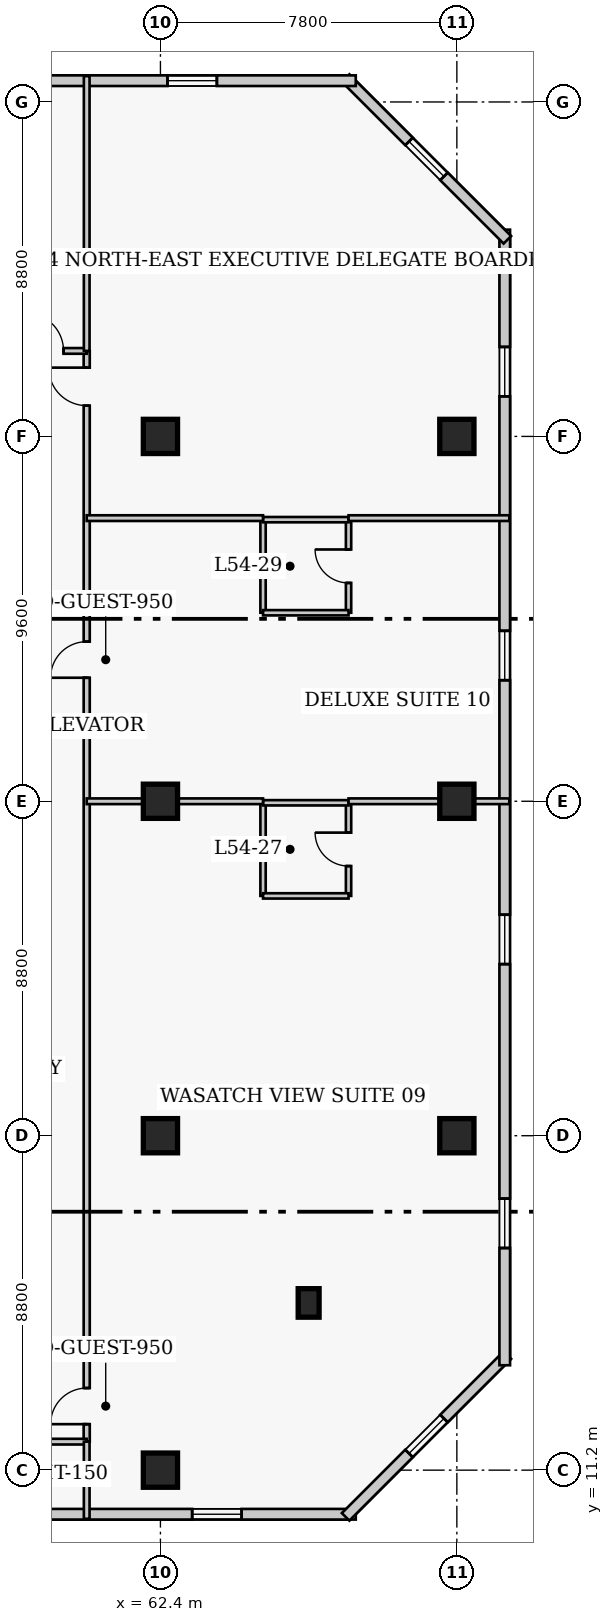
"""IFC4 building model, lengths in metres.
Left out: names, types, materials, properties, quantities, classifications, styles, units other than length and angle.
Written with IfcOpenShell. Run it as: python <this file> out.ifc"""

import sys

from ifc_helpers import new_model, si_unit, direction, frame, frame_2d, origin, origin_2d, place, context, subcontext, project, spatial, rectangle, extrude, element, fill, save


model = new_model("IFC4")
c1 = context("Model", 3, precision=1e-05, world=origin(), true_north=direction((0.0, 1.0)))
c2 = subcontext(c1, "Body", "Model", "MODEL_VIEW")
j1 = project(units=[si_unit("LENGTHUNIT", "METRE"), si_unit("PLANEANGLEUNIT", "RADIAN")], contexts=[c1])
p1 = place(None, origin())
s1 = spatial("IfcSite", under=j1, at=p1, CompositionType="ELEMENT")
p2 = place(p1, origin())
s2 = spatial("IfcBuilding", under=s1, at=p2, CompositionType="ELEMENT")
p3 = place(p2, frame((0.0, 0.0, 216.3)))
s3 = spatial("IfcBuildingStorey", under=s2, at=p3, CompositionType="ELEMENT", Elevation=216.3)
for number, where, z_axis, x_axis in (
    (1, (62.4, 11.2, 0.0), (0.0, 0.0, 1.0), (1.0, 0.0, 0.0)),
    (2, (62.4, 20.0, 0.0), (0.0, 0.0, 1.0), (1.0, 0.0, 0.0)),
    (3, (62.4, 28.8, 0.0), (0.0, 0.0, 1.0), (1.0, 0.0, 0.0)),
    (4, (62.4, 38.4, 0.0), (0.0, 0.0, 1.0), (1.0, 0.0, 0.0)),
    (5, (70.2, 20.0, 0.0), (0.0, 0.0, 1.0), (1.0, 0.0, 0.0)),
    (6, (70.2, 28.8, 0.0), (0.0, 0.0, 1.0), (1.0, 0.0, 0.0)),
    (7, (70.2, 38.4, 0.0), (0.0, 0.0, 1.0), (1.0, 0.0, 0.0)),
):
    element("IfcColumn", number, at=place(p3, frame(where, z_axis=z_axis, x_axis=x_axis)), inside=s3, PredefinedType="COLUMN", context=c2, shape_type="SweptSolid", body=[
        extrude(rectangle(XDim=0.9, YDim=0.9, at=origin_2d()), origin(), (0.0, 0.0, 1.0), 3.9),
    ])
p4 = place(p3, frame((66.3, 15.6, 0.0), z_axis=(0.0, 0.0, 1.0), x_axis=(1.0, 0.0, 0.0)))
e8 = element("IfcColumn", 8, at=p4, inside=s3, PredefinedType="PILASTER", context=c2, shape_type="SweptSolid", body=[
    extrude(rectangle(XDim=0.55, YDim=0.75, at=origin_2d()), origin(), (0.0, 0.0, 1.0), 3.9),
])
p5 = place(p3, frame((41.71, 10.04, 0.0), z_axis=(0.0, 0.0, 1.0), x_axis=(1.0, 0.0, 0.0)))
e9 = element("IfcWall", 9, at=p5, inside=s3, PredefinedType="SOLIDWALL", context=c2, shape_type="SweptSolid", body=[
    extrude(rectangle(XDim=25.83, YDim=0.28, at=frame_2d((12.915, 0.0))), origin(), (0.0, 0.0, 1.0), 3.65),
])
p6 = place(p5, frame((3.005, 0.0, 0.85)))
e10 = element("IfcOpeningElement", 10, at=p6, cuts=e9, PredefinedType="OPENING", context=c2, shape_type="SweptSolid", body=[
    extrude(rectangle(XDim=1.3, YDim=1.7, at=frame_2d((0.65, 0.85))), frame((0.0, 0.15, 0.0), z_axis=(0.0, -1.0, 0.0), x_axis=(1.0, 0.0, 0.0)), (0.0, 0.0, 1.0), 0.3),
])
p7 = place(p5, frame((13.415, 0.0, 0.85)))
e11 = element("IfcOpeningElement", 11, at=p7, cuts=e9, PredefinedType="OPENING", context=c2, shape_type="SweptSolid", body=[
    extrude(rectangle(XDim=1.3, YDim=1.7, at=frame_2d((0.65, 0.85))), frame((0.0, 0.15, 0.0), z_axis=(0.0, -1.0, 0.0), x_axis=(1.0, 0.0, 0.0)), (0.0, 0.0, 1.0), 0.3),
])
p8 = place(p5, frame((21.525, 0.0, 0.85)))
e12 = element("IfcOpeningElement", 12, at=p8, cuts=e9, PredefinedType="OPENING", context=c2, shape_type="SweptSolid", body=[
    extrude(rectangle(XDim=1.3, YDim=1.7, at=frame_2d((0.65, 0.85))), frame((0.0, 0.15, 0.0), z_axis=(0.0, -1.0, 0.0), x_axis=(1.0, 0.0, 0.0)), (0.0, 0.0, 1.0), 0.3),
])
p9 = place(p3, frame((67.273, 9.971, 0.0), z_axis=(0.0, 0.0, 1.0), x_axis=(0.707106781187, 0.707106781187, 0.0)))
e13 = element("IfcWall", 13, at=p9, inside=s3, PredefinedType="SOLIDWALL", context=c2, shape_type="SweptSolid", body=[
    extrude(rectangle(XDim=6.02, YDim=0.28, at=frame_2d((3.01, 0.0))), origin(), (0.0, 0.0, 1.0), 3.65),
])
p10 = place(p9, frame((2.36, 0.0, 0.85)))
e14 = element("IfcOpeningElement", 14, at=p10, cuts=e13, PredefinedType="OPENING", context=c2, shape_type="SweptSolid", body=[
    extrude(rectangle(XDim=1.3, YDim=1.7, at=frame_2d((0.65, 0.85))), frame((0.0, 0.15, 0.0), z_axis=(0.0, -1.0, 0.0), x_axis=(1.0, 0.0, 0.0)), (0.0, 0.0, 1.0), 0.3),
])
p11 = place(p3, frame((71.46, 13.96, 0.0), z_axis=(0.0, 0.0, 1.0), x_axis=(0.0, 1.0, 0.0)))
e15 = element("IfcWall", 15, at=p11, inside=s3, PredefinedType="SOLIDWALL", context=c2, shape_type="SweptSolid", body=[
    extrude(rectangle(XDim=29.88, YDim=0.28, at=frame_2d((14.94, 0.0))), origin(), (0.0, 0.0, 1.0), 3.65),
])
p12 = place(p11, frame((3.085, 0.0, 0.85)))
e16 = element("IfcOpeningElement", 16, at=p12, cuts=e15, PredefinedType="OPENING", context=c2, shape_type="SweptSolid", body=[
    extrude(rectangle(XDim=1.3, YDim=1.7, at=frame_2d((0.65, 0.85))), frame((0.0, 0.15, 0.0), z_axis=(0.0, -1.0, 0.0), x_axis=(1.0, 0.0, 0.0)), (0.0, 0.0, 1.0), 0.3),
])
p13 = place(p11, frame((10.555, 0.0, 0.85)))
e17 = element("IfcOpeningElement", 17, at=p13, cuts=e15, PredefinedType="OPENING", context=c2, shape_type="SweptSolid", body=[
    extrude(rectangle(XDim=1.3, YDim=1.7, at=frame_2d((0.65, 0.85))), frame((0.0, 0.15, 0.0), z_axis=(0.0, -1.0, 0.0), x_axis=(1.0, 0.0, 0.0)), (0.0, 0.0, 1.0), 0.3),
])
p14 = place(p11, frame((18.025, 0.0, 0.85)))
e18 = element("IfcOpeningElement", 18, at=p14, cuts=e15, PredefinedType="OPENING", context=c2, shape_type="SweptSolid", body=[
    extrude(rectangle(XDim=1.3, YDim=1.7, at=frame_2d((0.65, 0.85))), frame((0.0, 0.15, 0.0), z_axis=(0.0, -1.0, 0.0), x_axis=(1.0, 0.0, 0.0)), (0.0, 0.0, 1.0), 0.3),
])
p15 = place(p11, frame((25.495, 0.0, 0.85)))
e19 = element("IfcOpeningElement", 19, at=p15, cuts=e15, PredefinedType="OPENING", context=c2, shape_type="SweptSolid", body=[
    extrude(rectangle(XDim=1.3, YDim=1.7, at=frame_2d((0.65, 0.85))), frame((0.0, 0.15, 0.0), z_axis=(0.0, -1.0, 0.0), x_axis=(1.0, 0.0, 0.0)), (0.0, 0.0, 1.0), 0.3),
])
p16 = place(p3, frame((71.529, 43.573, 0.0), z_axis=(0.0, 0.0, 1.0), x_axis=(-0.707106781187, 0.707106781187, 0.0)))
e20 = element("IfcWall", 20, at=p16, inside=s3, PredefinedType="SOLIDWALL", context=c2, shape_type="SweptSolid", body=[
    extrude(rectangle(XDim=6.02, YDim=0.28, at=frame_2d((3.01, 0.0))), origin(), (0.0, 0.0, 1.0), 3.65),
])
p17 = place(p16, frame((2.36, 0.0, 0.85)))
e21 = element("IfcOpeningElement", 21, at=p17, cuts=e20, PredefinedType="OPENING", context=c2, shape_type="SweptSolid", body=[
    extrude(rectangle(XDim=1.3, YDim=1.7, at=frame_2d((0.65, 0.85))), frame((0.0, 0.15, 0.0), z_axis=(0.0, -1.0, 0.0), x_axis=(1.0, 0.0, 0.0)), (0.0, 0.0, 1.0), 0.3),
])
p18 = place(p3, frame((67.54, 47.76, 0.0), z_axis=(0.0, 0.0, 1.0), x_axis=(-1.0, 0.0, 0.0)))
e22 = element("IfcWall", 22, at=p18, inside=s3, PredefinedType="SOLIDWALL", context=c2, shape_type="SweptSolid", body=[
    extrude(rectangle(XDim=25.83, YDim=0.28, at=frame_2d((12.915, 0.0))), origin(), (0.0, 0.0, 1.0), 3.65),
])
p19 = place(p18, frame((3.655, 0.0, 0.85)))
e23 = element("IfcOpeningElement", 23, at=p19, cuts=e22, PredefinedType="OPENING", context=c2, shape_type="SweptSolid", body=[
    extrude(rectangle(XDim=1.3, YDim=1.7, at=frame_2d((0.65, 0.85))), frame((0.0, 0.15, 0.0), z_axis=(0.0, -1.0, 0.0), x_axis=(1.0, 0.0, 0.0)), (0.0, 0.0, 1.0), 0.3),
])
p20 = place(p18, frame((22.025, 0.0, 0.85)))
e24 = element("IfcOpeningElement", 24, at=p20, cuts=e22, PredefinedType="OPENING", context=c2, shape_type="SweptSolid", body=[
    extrude(rectangle(XDim=1.3, YDim=1.7, at=frame_2d((0.65, 0.85))), frame((0.0, 0.15, 0.0), z_axis=(0.0, -1.0, 0.0), x_axis=(1.0, 0.0, 0.0)), (0.0, 0.0, 1.0), 0.3),
])
p21 = place(p3, frame((60.46, 11.95, 0.0), z_axis=(0.0, 0.0, 1.0), x_axis=(0.0, 1.0, 0.0)))
e25 = element("IfcWall", 25, at=p21, inside=s3, PredefinedType="PARTITIONING", context=c2, shape_type="SweptSolid", body=[
    extrude(rectangle(XDim=28.7, YDim=0.16, at=frame_2d((14.35, 0.0))), origin(), (0.0, 0.0, 1.0), 3.65),
])
p22 = place(p21, frame((0.46, 0.0, 0.0)))
e26 = element("IfcOpeningElement", 26, at=p22, cuts=e25, PredefinedType="OPENING", context=c2, shape_type="SweptSolid", body=[
    extrude(rectangle(XDim=0.95, YDim=2.1, at=frame_2d((0.475, 1.05))), frame((0.0, 0.09, 0.0), z_axis=(0.0, -1.0, 0.0), x_axis=(1.0, 0.0, 0.0)), (0.0, 0.0, 1.0), 0.18),
])
p23 = place(p21, frame((20.1, 0.0, 0.0)))
e27 = element("IfcOpeningElement", 27, at=p23, cuts=e25, PredefinedType="OPENING", context=c2, shape_type="SweptSolid", body=[
    extrude(rectangle(XDim=0.95, YDim=2.1, at=frame_2d((0.475, 1.05))), frame((0.0, 0.09, 0.0), z_axis=(0.0, -1.0, 0.0), x_axis=(1.0, 0.0, 0.0)), (0.0, 0.0, 1.0), 0.18),
])
p24 = place(p21, frame((27.26, 0.0, 0.0)))
e28 = element("IfcOpeningElement", 28, at=p24, cuts=e25, PredefinedType="OPENING", context=c2, shape_type="SweptSolid", body=[
    extrude(rectangle(XDim=1.0, YDim=2.15, at=frame_2d((0.5, 1.075))), frame((0.0, 0.09, 0.0), z_axis=(0.0, -1.0, 0.0), x_axis=(1.0, 0.0, 0.0)), (0.0, 0.0, 1.0), 0.18),
])
p25 = place(p3, frame((58.24, 11.95, 0.0), z_axis=(0.0, 0.0, 1.0), x_axis=(1.0, 0.0, 0.0)))
e29 = element("IfcWall", 29, at=p25, inside=s3, PredefinedType="PARTITIONING", context=c2, shape_type="SweptSolid", body=[
    extrude(rectangle(XDim=2.22, YDim=0.15, at=frame_2d((1.11, 0.0))), origin(), (0.0, 0.0, 1.0), 3.65),
])
p26 = place(p3, frame((56.8, 40.65, 0.0), z_axis=(0.0, 0.0, 1.0), x_axis=(1.0, 0.0, 0.0)))
e30 = element("IfcWall", 30, at=p26, inside=s3, PredefinedType="PARTITIONING", context=c2, shape_type="SweptSolid", body=[
    extrude(rectangle(XDim=3.66, YDim=0.15, at=frame_2d((1.83, 0.0))), origin(), (0.0, 0.0, 1.0), 3.65),
])
p27 = place(p26, frame((2.05, 0.0, 0.0)))
e31 = element("IfcOpeningElement", 31, at=p27, cuts=e30, PredefinedType="OPENING", context=c2, shape_type="SweptSolid", body=[
    extrude(rectangle(XDim=1.0, YDim=2.15, at=frame_2d((0.5, 1.075))), frame((0.0, 0.085, 0.0), z_axis=(0.0, -1.0, 0.0), x_axis=(1.0, 0.0, 0.0)), (0.0, 0.0, 1.0), 0.17),
])
p28 = place(p3, frame((60.46, 40.65, 0.0), z_axis=(0.0, 0.0, 1.0), x_axis=(0.0, 1.0, 0.0)))
e32 = element("IfcWall", 32, at=p28, inside=s3, PredefinedType="PARTITIONING", context=c2, shape_type="SweptSolid", body=[
    extrude(rectangle(XDim=7.23, YDim=0.15, at=frame_2d((3.615, 0.0))), origin(), (0.0, 0.0, 1.0), 3.65),
])
p29 = place(p3, frame((60.46, 9.92, 0.0), z_axis=(0.0, 0.0, 1.0), x_axis=(0.0, 1.0, 0.0)))
e33 = element("IfcWall", 33, at=p29, inside=s3, PredefinedType="PARTITIONING", context=c2, shape_type="SweptSolid", body=[
    extrude(rectangle(XDim=2.03, YDim=0.15, at=frame_2d((1.015, 0.0))), origin(), (0.0, 0.0, 1.0), 3.65),
])
p30 = place(p3, frame((65.1, 26.31, 0.0), z_axis=(0.0, 0.0, 1.0), x_axis=(0.0, 1.0, 0.0)))
e34 = element("IfcWall", 34, at=p30, inside=s3, PredefinedType="PLUMBINGWALL", context=c2, shape_type="SweptSolid", body=[
    extrude(rectangle(XDim=2.45, YDim=0.14, at=frame_2d((1.225, 0.0))), origin(), (0.0, 0.0, 1.0), 3.65),
])
p31 = place(p3, frame((67.35, 26.31, 0.0), z_axis=(0.0, 0.0, 1.0), x_axis=(0.0, 1.0, 0.0)))
e35 = element("IfcWall", 35, at=p31, inside=s3, PredefinedType="PLUMBINGWALL", context=c2, shape_type="SweptSolid", body=[
    extrude(rectangle(XDim=2.45, YDim=0.14, at=frame_2d((1.225, 0.0))), origin(), (0.0, 0.0, 1.0), 3.65),
])
p32 = place(p31, frame((0.785, 0.0, 0.0)))
e36 = element("IfcOpeningElement", 36, at=p32, cuts=e35, PredefinedType="OPENING", context=c2, shape_type="SweptSolid", body=[
    extrude(rectangle(XDim=0.88, YDim=2.05, at=frame_2d((0.44, 1.025))), frame((0.0, 0.08, 0.0), z_axis=(0.0, -1.0, 0.0), x_axis=(1.0, 0.0, 0.0)), (0.0, 0.0, 1.0), 0.16),
])
p33 = place(p3, frame((65.1, 26.31, 0.0), z_axis=(0.0, 0.0, 1.0), x_axis=(1.0, 0.0, 0.0)))
e37 = element("IfcWall", 37, at=p33, inside=s3, PredefinedType="PLUMBINGWALL", context=c2, shape_type="SweptSolid", body=[
    extrude(rectangle(XDim=2.25, YDim=0.14, at=frame_2d((1.125, 0.0))), origin(), (0.0, 0.0, 1.0), 3.65),
])
p34 = place(p3, frame((65.1, 28.76, 0.0), z_axis=(0.0, 0.0, 1.0), x_axis=(1.0, 0.0, 0.0)))
e38 = element("IfcWall", 38, at=p34, inside=s3, PredefinedType="PLUMBINGWALL", context=c2, shape_type="SweptSolid", body=[
    extrude(rectangle(XDim=2.25, YDim=0.14, at=frame_2d((1.125, 0.0))), origin(), (0.0, 0.0, 1.0), 3.038),
])
p35 = place(p3, frame((60.46, 28.8, 0.0), z_axis=(0.0, 0.0, 1.0), x_axis=(1.0, 0.0, 0.0)))
e39 = element("IfcWall", 39, at=p35, inside=s3, PredefinedType="PARTITIONING", context=c2, shape_type="SweptSolid", body=[
    extrude(rectangle(XDim=4.64, YDim=0.15, at=frame_2d((2.32, 0.0))), origin(), (0.0, 0.0, 1.0), 2.878),
])
p36 = place(p3, frame((67.35, 28.8, 0.0), z_axis=(0.0, 0.0, 1.0), x_axis=(1.0, 0.0, 0.0)))
e40 = element("IfcWall", 40, at=p36, inside=s3, PredefinedType="PARTITIONING", context=c2, shape_type="SweptSolid", body=[
    extrude(rectangle(XDim=4.23, YDim=0.15, at=frame_2d((2.115, 0.0))), origin(), (0.0, 0.0, 1.0), 2.878),
])
p37 = place(p3, frame((65.1, 33.76, 0.0), z_axis=(0.0, 0.0, 1.0), x_axis=(0.0, 1.0, 0.0)))
e41 = element("IfcWall", 41, at=p37, inside=s3, PredefinedType="PLUMBINGWALL", context=c2, shape_type="SweptSolid", body=[
    extrude(rectangle(XDim=2.45, YDim=0.14, at=frame_2d((1.225, 0.0))), origin(), (0.0, 0.0, 1.0), 3.65),
])
p38 = place(p3, frame((67.35, 33.76, 0.0), z_axis=(0.0, 0.0, 1.0), x_axis=(0.0, 1.0, 0.0)))
e42 = element("IfcWall", 42, at=p38, inside=s3, PredefinedType="PLUMBINGWALL", context=c2, shape_type="SweptSolid", body=[
    extrude(rectangle(XDim=2.45, YDim=0.14, at=frame_2d((1.225, 0.0))), origin(), (0.0, 0.0, 1.0), 3.65),
])
p39 = place(p38, frame((0.785, 0.0, 0.0)))
e43 = element("IfcOpeningElement", 43, at=p39, cuts=e42, PredefinedType="OPENING", context=c2, shape_type="SweptSolid", body=[
    extrude(rectangle(XDim=0.88, YDim=2.05, at=frame_2d((0.44, 1.025))), frame((0.0, 0.08, 0.0), z_axis=(0.0, -1.0, 0.0), x_axis=(1.0, 0.0, 0.0)), (0.0, 0.0, 1.0), 0.16),
])
for number, where, z_axis, x_axis in (
    (44, (65.1, 33.76, 0.0), (0.0, 0.0, 1.0), (1.0, 0.0, 0.0)),
    (45, (65.1, 36.21, 0.0), (0.0, 0.0, 1.0), (1.0, 0.0, 0.0)),
):
    element("IfcWall", number, at=place(p3, frame(where, z_axis=z_axis, x_axis=x_axis)), inside=s3, PredefinedType="PLUMBINGWALL", context=c2, shape_type="SweptSolid", body=[
        extrude(rectangle(XDim=2.25, YDim=0.14, at=frame_2d((1.125, 0.0))), origin(), (0.0, 0.0, 1.0), 3.65),
    ])
p40 = place(p3, frame((60.46, 36.25, 0.0), z_axis=(0.0, 0.0, 1.0), x_axis=(1.0, 0.0, 0.0)))
e46 = element("IfcWall", 46, at=p40, inside=s3, PredefinedType="PARTITIONING", context=c2, shape_type="SweptSolid", body=[
    extrude(rectangle(XDim=4.64, YDim=0.15, at=frame_2d((2.32, 0.0))), origin(), (0.0, 0.0, 1.0), 3.65),
])
p41 = place(p3, frame((67.35, 36.25, 0.0), z_axis=(0.0, 0.0, 1.0), x_axis=(1.0, 0.0, 0.0)))
e47 = element("IfcWall", 47, at=p41, inside=s3, PredefinedType="PARTITIONING", context=c2, shape_type="SweptSolid", body=[
    extrude(rectangle(XDim=4.23, YDim=0.15, at=frame_2d((2.115, 0.0))), origin(), (0.0, 0.0, 1.0), 3.65),
])
p42 = place(p8, origin())
e48 = element("IfcWindow", 48, at=p42, inside=s3, PartitioningType="SINGLE_PANEL", PredefinedType="WINDOW", context=c2, shape_type="SweptSolid", body=[
    extrude(rectangle(XDim=1.3, YDim=1.7, at=frame_2d((0.65, 0.85))), frame((0.0, 0.03, 0.0), z_axis=(0.0, -1.0, 0.0), x_axis=(1.0, 0.0, 0.0)), (0.0, 0.0, 1.0), 0.06),
])
fill(e12, e48)
p43 = place(p10, origin())
e49 = element("IfcWindow", 49, at=p43, inside=s3, PartitioningType="SINGLE_PANEL", PredefinedType="WINDOW", context=c2, shape_type="SweptSolid", body=[
    extrude(rectangle(XDim=1.3, YDim=1.7, at=frame_2d((0.65, 0.85))), frame((0.0, 0.03, 0.0), z_axis=(0.0, -1.0, 0.0), x_axis=(1.0, 0.0, 0.0)), (0.0, 0.0, 1.0), 0.06),
])
fill(e14, e49)
p44 = place(p12, origin())
e50 = element("IfcWindow", 50, at=p44, inside=s3, PartitioningType="SINGLE_PANEL", PredefinedType="WINDOW", context=c2, shape_type="SweptSolid", body=[
    extrude(rectangle(XDim=1.3, YDim=1.7, at=frame_2d((0.65, 0.85))), frame((0.0, 0.03, 0.0), z_axis=(0.0, -1.0, 0.0), x_axis=(1.0, 0.0, 0.0)), (0.0, 0.0, 1.0), 0.06),
])
fill(e16, e50)
p45 = place(p13, origin())
e51 = element("IfcWindow", 51, at=p45, inside=s3, PartitioningType="SINGLE_PANEL", PredefinedType="WINDOW", context=c2, shape_type="SweptSolid", body=[
    extrude(rectangle(XDim=1.3, YDim=1.7, at=frame_2d((0.65, 0.85))), frame((0.0, 0.03, 0.0), z_axis=(0.0, -1.0, 0.0), x_axis=(1.0, 0.0, 0.0)), (0.0, 0.0, 1.0), 0.06),
])
fill(e17, e51)
p46 = place(p14, origin())
e52 = element("IfcWindow", 52, at=p46, inside=s3, PartitioningType="SINGLE_PANEL", PredefinedType="WINDOW", context=c2, shape_type="SweptSolid", body=[
    extrude(rectangle(XDim=1.3, YDim=1.7, at=frame_2d((0.65, 0.85))), frame((0.0, 0.03, 0.0), z_axis=(0.0, -1.0, 0.0), x_axis=(1.0, 0.0, 0.0)), (0.0, 0.0, 1.0), 0.06),
])
fill(e18, e52)
p47 = place(p15, origin())
e53 = element("IfcWindow", 53, at=p47, inside=s3, PartitioningType="SINGLE_PANEL", PredefinedType="WINDOW", context=c2, shape_type="SweptSolid", body=[
    extrude(rectangle(XDim=1.3, YDim=1.7, at=frame_2d((0.65, 0.85))), frame((0.0, 0.03, 0.0), z_axis=(0.0, -1.0, 0.0), x_axis=(1.0, 0.0, 0.0)), (0.0, 0.0, 1.0), 0.06),
])
fill(e19, e53)
p48 = place(p17, origin())
e54 = element("IfcWindow", 54, at=p48, inside=s3, PartitioningType="SINGLE_PANEL", PredefinedType="WINDOW", context=c2, shape_type="SweptSolid", body=[
    extrude(rectangle(XDim=1.3, YDim=1.7, at=frame_2d((0.65, 0.85))), frame((0.0, 0.03, 0.0), z_axis=(0.0, -1.0, 0.0), x_axis=(1.0, 0.0, 0.0)), (0.0, 0.0, 1.0), 0.06),
])
fill(e21, e54)
p49 = place(p19, origin())
e55 = element("IfcWindow", 55, at=p49, inside=s3, PartitioningType="SINGLE_PANEL", PredefinedType="WINDOW", context=c2, shape_type="SweptSolid", body=[
    extrude(rectangle(XDim=1.3, YDim=1.7, at=frame_2d((0.65, 0.85))), frame((0.0, 0.03, 0.0), z_axis=(0.0, -1.0, 0.0), x_axis=(1.0, 0.0, 0.0)), (0.0, 0.0, 1.0), 0.06),
])
fill(e23, e55)
p50 = place(p27, origin())
e56 = element("IfcDoor", 56, at=p50, inside=s3, OperationType="SINGLE_SWING_LEFT", PredefinedType="DOOR", context=c2, shape_type="SweptSolid", body=[
    extrude(rectangle(XDim=1.0, YDim=2.15, at=frame_2d((0.5, 1.075))), frame((0.0, 0.025, 0.0), z_axis=(0.0, -1.0, 0.0), x_axis=(1.0, 0.0, 0.0)), (0.0, 0.0, 1.0), 0.05),
])
fill(e31, e56)
p51 = place(p32, origin())
e57 = element("IfcDoor", 57, at=p51, inside=s3, OperationType="SINGLE_SWING_RIGHT", PredefinedType="DOOR", context=c2, shape_type="SweptSolid", body=[
    extrude(rectangle(XDim=0.88, YDim=2.05, at=frame_2d((0.44, 1.025))), frame((0.0, 0.025, 0.0), z_axis=(0.0, -1.0, 0.0), x_axis=(1.0, 0.0, 0.0)), (0.0, 0.0, 1.0), 0.05),
])
fill(e36, e57)
p52 = place(p22, origin())
e58 = element("IfcDoor", 58, at=p52, inside=s3, OperationType="SINGLE_SWING_LEFT", PredefinedType="DOOR", context=c2, shape_type="SweptSolid", body=[
    extrude(rectangle(XDim=0.95, YDim=2.1, at=frame_2d((0.475, 1.05))), frame((0.0, 0.025, 0.0), z_axis=(0.0, -1.0, 0.0), x_axis=(1.0, 0.0, 0.0)), (0.0, 0.0, 1.0), 0.05),
])
fill(e26, e58)
p53 = place(p39, origin())
e59 = element("IfcDoor", 59, at=p53, inside=s3, OperationType="SINGLE_SWING_RIGHT", PredefinedType="DOOR", context=c2, shape_type="SweptSolid", body=[
    extrude(rectangle(XDim=0.88, YDim=2.05, at=frame_2d((0.44, 1.025))), frame((0.0, 0.025, 0.0), z_axis=(0.0, -1.0, 0.0), x_axis=(1.0, 0.0, 0.0)), (0.0, 0.0, 1.0), 0.05),
])
fill(e43, e59)
p54 = place(p23, origin())
e60 = element("IfcDoor", 60, at=p54, inside=s3, OperationType="SINGLE_SWING_LEFT", PredefinedType="DOOR", context=c2, shape_type="SweptSolid", body=[
    extrude(rectangle(XDim=0.95, YDim=2.1, at=frame_2d((0.475, 1.05))), frame((0.0, 0.025, 0.0), z_axis=(0.0, -1.0, 0.0), x_axis=(1.0, 0.0, 0.0)), (0.0, 0.0, 1.0), 0.05),
])
fill(e27, e60)
p55 = place(p24, origin())
e61 = element("IfcDoor", 61, at=p55, inside=s3, OperationType="SINGLE_SWING_RIGHT", PredefinedType="DOOR", context=c2, shape_type="SweptSolid", body=[
    extrude(rectangle(XDim=1.0, YDim=2.15, at=frame_2d((0.5, 1.075))), frame((0.0, 0.025, 0.0), z_axis=(0.0, -1.0, 0.0), x_axis=(1.0, 0.0, 0.0)), (0.0, 0.0, 1.0), 0.05),
])
fill(e28, e61)
save(model, sys.argv[1])
